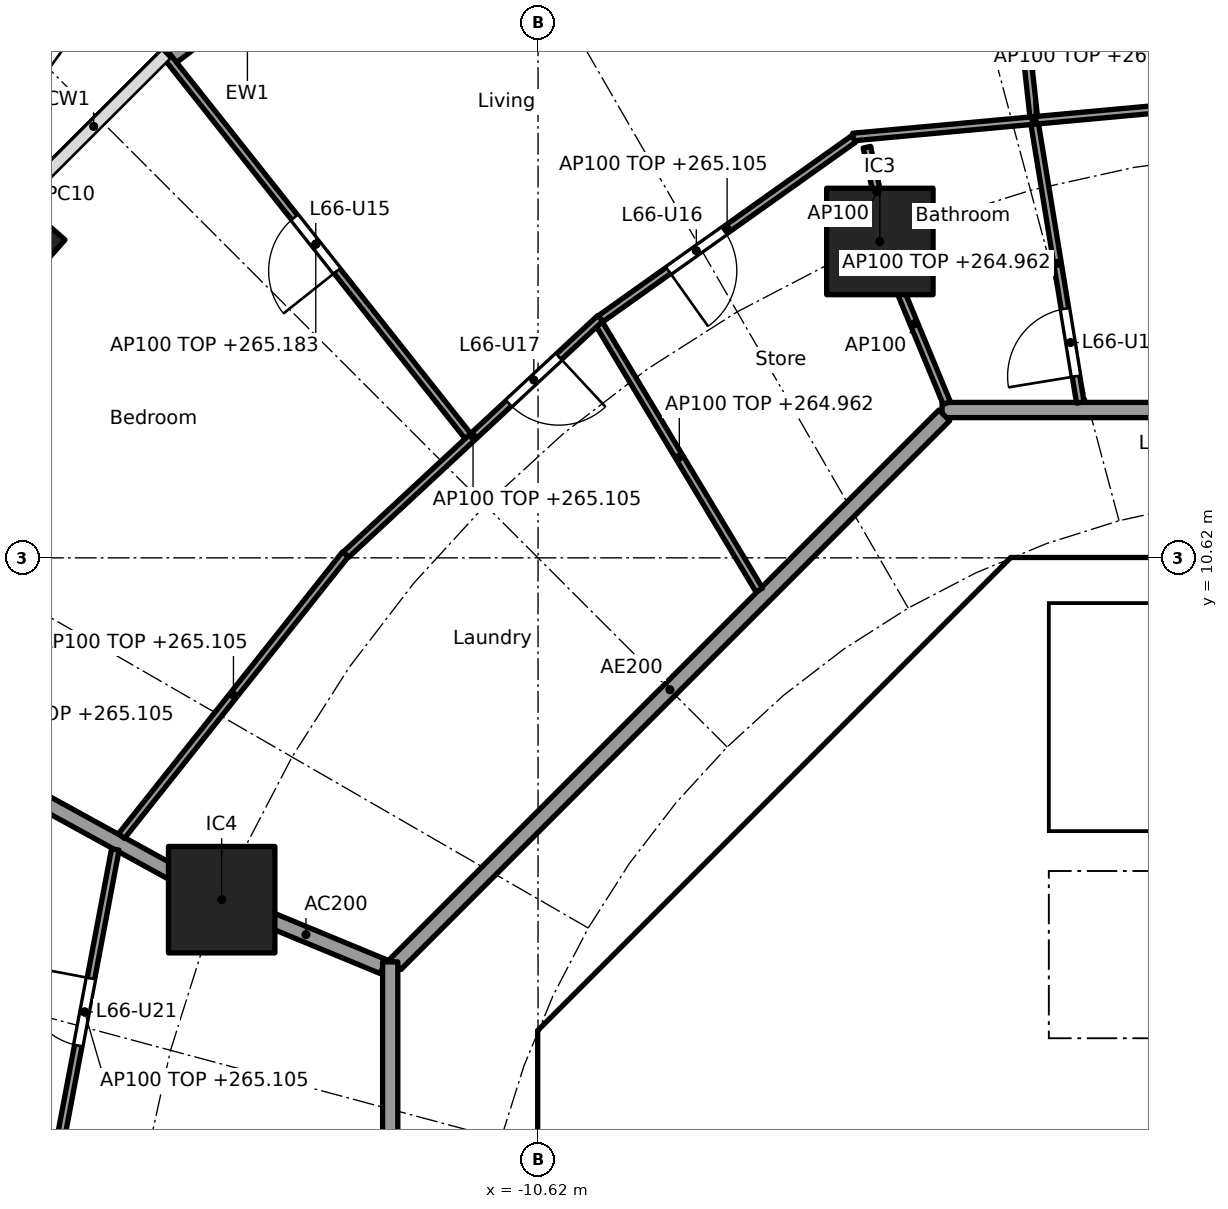
"""IFC4 building model, lengths in metres.
Left out: names, types, materials, properties, quantities, classifications, styles, units other than length and angle.
Written with IfcOpenShell. Run it as: python <this file> out.ifc"""

import sys

from ifc_helpers import new_model, si_unit, direction, frame, frame_2d, origin, origin_2d, place, context, subcontext, project, spatial, polyline, rectangle, hollow_rectangle, outline, extrude, element, fill, save


model = new_model("IFC4")
c1 = context("Model", 3, precision=1e-05, world=origin(), true_north=direction((0.0, 1.0)))
c2 = subcontext(c1, "Body", "Model", "MODEL_VIEW")
j1 = project(units=[si_unit("LENGTHUNIT", "METRE"), si_unit("PLANEANGLEUNIT", "RADIAN")], contexts=[c1])
p1 = place(None, origin())
s1 = spatial("IfcSite", under=j1, at=p1, CompositionType="ELEMENT")
p2 = place(p1, origin())
s2 = spatial("IfcBuilding", under=s1, at=p2, CompositionType="ELEMENT")
p3 = place(p2, frame((0.0, 0.0, 262.2)))
s3 = spatial("IfcBuildingStorey", under=s2, at=p3, CompositionType="ELEMENT", Elevation=262.2)
p4 = place(p3, frame((-17.441, 14.73, 0.0), z_axis=(0.0, 0.0, 1.0), x_axis=(-0.660114607735, -0.751164898445, 0.0)))
e1 = element("IfcColumn", 1, at=p4, inside=s3, PredefinedType="COLUMN", context=c2, shape_type="SweptSolid", body=[
    extrude(hollow_rectangle(XDim=0.9, YDim=0.8, WallThickness=0.028, at=origin_2d()), origin(), (0.0, 0.0, 1.0), 3.7),
])
for number, where, z_axis, x_axis in (
    (2, (-6.123, 14.782, 0.0), (0.0, 0.0, 1.0), (1.0, 0.0, 0.0)),
    (3, (-14.782, 6.123, 0.0), (0.0, 0.0, 1.0), (1.0, 0.0, 0.0)),
):
    element("IfcColumn", number, at=place(p3, frame(where, z_axis=z_axis, x_axis=x_axis)), inside=s3, PredefinedType="COLUMN", context=c2, shape_type="SweptSolid", body=[
        extrude(rectangle(XDim=1.4, YDim=1.4, at=origin_2d()), origin(), (0.0, 0.0, 1.0), 3.7),
    ])
p5 = place(p3, frame((-15.495, 17.204, 0.0), z_axis=(0.0, 0.0, 1.0), x_axis=(0.796010739377, 0.605282498339, 0.0)))
e4 = element("IfcWall", 4, at=p5, inside=s3, PredefinedType="SOLIDWALL", context=c2, shape_type="SweptSolid", body=[
    extrude(rectangle(XDim=2.641, YDim=0.25, at=frame_2d((1.32, 0.0))), origin(), (0.0, 0.0, 1.0), 3.44),
])
p6 = place(p5, frame((0.27, 0.0, 0.0)))
e5 = element("IfcOpeningElement", 5, at=p6, cuts=e4, PredefinedType="OPENING", context=c2, shape_type="SweptSolid", body=[
    extrude(rectangle(XDim=2.1, YDim=2.4, at=frame_2d((1.05, 1.2))), frame((0.0, 0.135, 0.0), z_axis=(0.0, -1.0, 0.0), x_axis=(1.0, 0.0, 0.0)), (0.0, 0.0, 1.0), 0.27),
])
p7 = place(p3, frame((-4.613, 9.988, 0.0), z_axis=(0.0, 0.0, 1.0), x_axis=(-0.707106781187, -0.707106781187, 0.0)))
e6 = element("IfcWall", 6, at=p7, inside=s3, PredefinedType="SHEAR", context=c2, shape_type="SweptSolid", body=[
    extrude(rectangle(XDim=7.602, YDim=0.6, at=frame_2d((3.801, 0.0))), origin(), (0.0, 0.0, 1.0), 3.44),
])
p8 = place(p7, frame((0.351, 0.0, 0.0)))
e7 = element("IfcOpeningElement", 7, at=p8, cuts=e6, PredefinedType="OPENING", context=c2, shape_type="SweptSolid", body=[
    extrude(rectangle(XDim=1.1, YDim=2.1, at=frame_2d((0.55, 1.05))), frame((0.0, 0.31, 0.0), z_axis=(0.0, -1.0, 0.0), x_axis=(1.0, 0.0, 0.0)), (0.0, 0.0, 1.0), 0.62),
])
p9 = place(p3, frame((-10.325, 3.801, 0.0), z_axis=(0.0, 0.0, 1.0), x_axis=(0.0, -1.0, 0.0)))
e8 = element("IfcWall", 8, at=p9, inside=s3, PredefinedType="SHEAR", context=c2, shape_type="SweptSolid", body=[
    extrude(rectangle(XDim=7.602, YDim=0.6, at=frame_2d((3.801, 0.0))), origin(), (0.0, 0.0, 1.0), 3.44),
])
p10 = place(p9, frame((0.651, 0.0, 0.0)))
e9 = element("IfcOpeningElement", 9, at=p10, cuts=e8, PredefinedType="OPENING", context=c2, shape_type="SweptSolid", body=[
    extrude(rectangle(XDim=1.5, YDim=2.1, at=frame_2d((0.75, 1.05))), frame((0.0, 0.31, 0.0), z_axis=(0.0, -1.0, 0.0), x_axis=(1.0, 0.0, 0.0)), (0.0, 0.0, 1.0), 0.62),
])
p11 = place(p9, frame((5.451, 0.0, 0.0)))
e10 = element("IfcOpeningElement", 10, at=p11, cuts=e8, PredefinedType="OPENING", context=c2, shape_type="SweptSolid", body=[
    extrude(rectangle(XDim=1.5, YDim=2.1, at=frame_2d((0.75, 1.05))), frame((0.0, 0.31, 0.0), z_axis=(0.0, -1.0, 0.0), x_axis=(1.0, 0.0, 0.0)), (0.0, 0.0, 1.0), 0.62),
])
p12 = place(p3, frame((-5.8, 4.3, 0.0), z_axis=(0.0, 0.0, 1.0), x_axis=(0.0, 1.0, 0.0)))
e11 = element("IfcWall", 11, at=p12, inside=s3, PredefinedType="PARTITIONING", context=c2, shape_type="SweptSolid", body=[
    extrude(rectangle(XDim=3.927, YDim=0.15, at=frame_2d((1.963, 0.0))), origin(), (0.0, 0.0, 1.0), 3.44),
])
p13 = place(p12, frame((1.551, 0.0, 0.0)))
e12 = element("IfcOpeningElement", 12, at=p13, cuts=e11, PredefinedType="OPENING", context=c2, shape_type="SweptSolid", body=[
    extrude(rectangle(XDim=0.9, YDim=2.1, at=frame_2d((0.45, 1.05))), frame((0.0, 0.085, 0.0), z_axis=(0.0, -1.0, 0.0), x_axis=(1.0, 0.0, 0.0)), (0.0, 0.0, 1.0), 0.17),
])
p14 = place(p3, frame((-4.0, 4.3, 0.0), z_axis=(0.0, 0.0, 1.0), x_axis=(0.0, 1.0, 0.0)))
e13 = element("IfcWall", 13, at=p14, inside=s3, PredefinedType="SOLIDWALL", context=c2, shape_type="SweptSolid", body=[
    extrude(rectangle(XDim=2.2, YDim=0.2, at=frame_2d((1.1, 0.0))), origin(), (0.0, 0.0, 1.0), 3.44),
])
p15 = place(p14, frame((0.55, 0.0, 0.0)))
e14 = element("IfcOpeningElement", 14, at=p15, cuts=e13, PredefinedType="OPENING", context=c2, shape_type="SweptSolid", body=[
    extrude(rectangle(XDim=1.1, YDim=2.1, at=frame_2d((0.55, 1.05))), frame((0.0, 0.11, 0.0), z_axis=(0.0, -1.0, 0.0), x_axis=(1.0, 0.0, 0.0)), (0.0, 0.0, 1.0), 0.22),
])
p16 = place(p3, origin())
e15 = element("IfcWall", 15, at=p16, inside=s3, PredefinedType="SHEAR", context=c2, shape_type="SweptSolid", body=[
    extrude(outline(polyline([(-10.2, 4.825), (-9.776, 4.401), (-10.025, 4.152), (-10.025, 3.801), (-10.625, 3.801), (-10.625, 4.401), (-10.2, 4.825)])), origin(), (0.0, 0.0, 1.0), 3.44),
])
p17 = place(p3, origin())
e16 = element("IfcWall", 16, at=p17, inside=s3, PredefinedType="SHEAR", context=c2, shape_type="SweptSolid", body=[
    extrude(outline(polyline([(-4.152, 10.025), (-4.401, 9.776), (-4.825, 10.2), (-4.401, 10.625), (4.401, 10.625), (4.825, 10.2), (4.401, 9.776), (4.152, 10.025), (-4.152, 10.025)])), origin(), (0.0, 0.0, 1.0), 3.44),
])
p18 = place(p3, origin())
e17 = element("IfcWall", 17, at=p18, inside=s3, PredefinedType="SOLIDWALL", context=c2, shape_type="SweptSolid", body=[
    extrude(outline(polyline([(-6.7, 4.3), (6.7, 4.3), (6.7, 2.1), (6.5, 2.1), (6.5, 4.1), (4.5, 4.1), (4.5, 2.1), (4.3, 2.1), (4.3, 4.1), (0.1, 4.1), (0.1, 2.1), (-0.1, 2.1), (-0.1, 4.1), (-6.5, 4.1), (-6.5, 2.1), (-6.7, 2.1), (-6.7, 4.3)])), origin(), (0.0, 0.0, 1.0), 3.44),
])
p19 = place(p3, frame((-10.025, 4.0, 0.0), z_axis=(0.0, 0.0, 1.0), x_axis=(1.0, 0.0, 0.0)))
e18 = element("IfcWall", 18, at=p19, inside=s3, PredefinedType="PARTITIONING", context=c2, shape_type="SweptSolid", body=[
    extrude(rectangle(XDim=3.325, YDim=0.2, at=frame_2d((1.662, 0.0))), origin(), (0.0, 0.0, 1.0), 3.44),
])
p20 = place(p3, origin())
e19 = element("IfcWall", 19, at=p20, inside=s3, PredefinedType="SOLIDWALL", context=c2, shape_type="SweptSolid", body=[
    extrude(outline(polyline([(-3.9, 7.025), (-4.1, 7.025), (-4.1, 10.025), (-3.9, 10.025), (-3.9, 7.025)])), origin(), (0.0, 0.0, 1.0), 3.44),
])
p21 = place(p3, origin())
e20 = element("IfcWall", 20, at=p21, inside=s3, PredefinedType="SOLIDWALL", context=c2, shape_type="SweptSolid", body=[
    extrude(outline(polyline([(4.1, 6.5), (-4.1, 6.5), (-4.1, 7.025), (4.1, 7.025), (4.1, 6.5)])), origin(), (0.0, 0.0, 1.0), 3.44),
])
p22 = place(p3, frame((-12.657, 5.243, 0.0), z_axis=(0.0, 0.0, 1.0), x_axis=(-0.923869415315, 0.382707856524, 0.0)))
e21 = element("IfcWall", 21, at=p22, inside=s3, PredefinedType="PARTITIONING", context=c2, shape_type="SweptSolid", body=[
    extrude(rectangle(XDim=2.2, YDim=0.2, at=frame_2d((1.1, 0.0))), origin(), (0.0, 0.0, 1.0), 3.44),
])
p23 = place(p3, frame((-14.826, 6.147, 0.0), z_axis=(0.0, 0.0, 1.0), x_axis=(-0.876484755865, 0.481429613481, 0.0)))
e22 = element("IfcWall", 22, at=p23, inside=s3, PredefinedType="PARTITIONING", context=c2, shape_type="SweptSolid", body=[
    extrude(rectangle(XDim=6.439, YDim=0.2, at=frame_2d((3.219, 0.0))), origin(), (0.0, 0.0, 1.0), 2.905),
])
p24 = place(p3, frame((5.104, 12.565, 0.0), z_axis=(0.0, 0.0, 1.0), x_axis=(-1.0, 0.0, 0.0)))
e23 = element("IfcWall", 23, at=p24, inside=s3, PredefinedType="PARTITIONING", context=c2, shape_type="SweptSolid", body=[
    extrude(rectangle(XDim=10.409, YDim=0.2, at=frame_2d((5.205, 0.0))), origin(), (0.0, 0.0, 1.0), 3.44),
])
p25 = place(p24, frame((6.339, 0.0, 0.0)))
e24 = element("IfcOpeningElement", 24, at=p25, cuts=e23, PredefinedType="OPENING", context=c2, shape_type="SweptSolid", body=[
    extrude(rectangle(XDim=1.0, YDim=2.1, at=frame_2d((0.5, 1.05))), frame((0.0, 0.11, 0.0), z_axis=(0.0, -1.0, 0.0), x_axis=(1.0, 0.0, 0.0)), (0.0, 0.0, 1.0), 0.22),
])
p26 = place(p3, frame((-5.275, 12.494, 0.0), z_axis=(0.0, 0.0, 1.0), x_axis=(-0.707106781187, -0.707106781187, 0.0)))
e25 = element("IfcWall", 25, at=p26, inside=s3, PredefinedType="PARTITIONING", context=c2, shape_type="SweptSolid", body=[
    extrude(rectangle(XDim=10.209, YDim=0.2, at=frame_2d((5.104, 0.0))), origin(), (0.0, 0.0, 1.0), 3.44),
])
p27 = place(p3, frame((-12.565, 5.304, 0.0), z_axis=(0.0, 0.0, 1.0), x_axis=(0.0, -1.0, 0.0)))
e26 = element("IfcWall", 26, at=p27, inside=s3, PredefinedType="PARTITIONING", context=c2, shape_type="SweptSolid", body=[
    extrude(rectangle(XDim=10.409, YDim=0.2, at=frame_2d((5.205, 0.0))), origin(), (0.0, 0.0, 1.0), 3.44),
])
p28 = place(p27, frame((6.539, 0.0, 0.0)))
e27 = element("IfcOpeningElement", 27, at=p28, cuts=e26, PredefinedType="OPENING", context=c2, shape_type="SweptSolid", body=[
    extrude(rectangle(XDim=1.0, YDim=2.1, at=frame_2d((0.5, 1.05))), frame((0.0, 0.11, 0.0), z_axis=(0.0, -1.0, 0.0), x_axis=(1.0, 0.0, 0.0)), (0.0, 0.0, 1.0), 0.22),
])
p29 = place(p3, frame((-1.711, 16.592, 0.0), z_axis=(0.0, 0.0, 1.0), x_axis=(-0.995843707015, -0.091078599017, 0.0)))
e28 = element("IfcWall", 28, at=p29, inside=s3, PredefinedType="PARTITIONING", context=c2, shape_type="SweptSolid", body=[
    extrude(rectangle(XDim=4.785, YDim=0.1, at=frame_2d((2.392, 0.0))), origin(), (0.0, 0.0, 1.0), 2.905),
])
p30 = place(p3, frame((-3.486, 12.663, 0.0), z_axis=(0.0, 0.0, 1.0), x_axis=(-0.161602751674, 0.986855891532, 0.0)))
e29 = element("IfcWall", 29, at=p30, inside=s3, PredefinedType="PARTITIONING", context=c2, shape_type="SweptSolid", body=[
    extrude(rectangle(XDim=3.71, YDim=0.1, at=frame_2d((1.855, 0.0))), origin(), (0.0, 0.0, 1.0), 2.762),
])
p31 = place(p30, frame((0.35, 0.0, 0.0)))
e30 = element("IfcOpeningElement", 30, at=p31, cuts=e29, PredefinedType="OPENING", context=c2, shape_type="SweptSolid", body=[
    extrude(rectangle(XDim=0.9, YDim=2.1, at=frame_2d((0.45, 1.05))), frame((0.0, 0.06, 0.0), z_axis=(0.0, -1.0, 0.0), x_axis=(1.0, 0.0, 0.0)), (0.0, 0.0, 1.0), 0.12),
])
p32 = place(p3, frame((-4.099, 16.424, 0.0), z_axis=(0.0, 0.0, 1.0), x_axis=(-0.10867295252, 0.99407755703, 0.0)))
e31 = element("IfcWall", 31, at=p32, inside=s3, PredefinedType="PARTITIONING", context=c2, shape_type="SweptSolid", body=[
    extrude(rectangle(XDim=5.974, YDim=0.1, at=frame_2d((2.987, 0.0))), origin(), (0.0, 0.0, 1.0), 2.983),
])
p33 = place(p32, frame((2.537, 0.0, 0.0)))
e32 = element("IfcOpeningElement", 32, at=p33, cuts=e31, PredefinedType="OPENING", context=c2, shape_type="SweptSolid", body=[
    extrude(rectangle(XDim=0.9, YDim=2.1, at=frame_2d((0.45, 1.05))), frame((0.0, 0.06, 0.0), z_axis=(0.0, -1.0, 0.0), x_axis=(1.0, 0.0, 0.0)), (0.0, 0.0, 1.0), 0.12),
])
p34 = place(p3, frame((-5.243, 12.657, 0.0), z_axis=(0.0, 0.0, 1.0), x_axis=(-0.382719158442, 0.923864733477, 0.0)))
e33 = element("IfcWall", 33, at=p34, inside=s3, PredefinedType="PARTITIONING", context=c2, shape_type="SweptSolid", body=[
    extrude(rectangle(XDim=2.25, YDim=0.1, at=frame_2d((1.125, 0.0))), origin(), (0.0, 0.0, 1.0), 3.44),
])
p35 = place(p3, frame((-6.467, 16.132, 0.0), z_axis=(0.0, 0.0, 1.0), x_axis=(-0.815192286069, -0.579190414919, 0.0)))
e34 = element("IfcWall", 34, at=p35, inside=s3, PredefinedType="PARTITIONING", context=c2, shape_type="SweptSolid", body=[
    extrude(rectangle(XDim=4.086, YDim=0.1, at=frame_2d((2.043, 0.0))), origin(), (0.0, 0.0, 1.0), 2.905),
])
p36 = place(p35, frame((2.09, 0.0, 0.0)))
e35 = element("IfcOpeningElement", 35, at=p36, cuts=e34, PredefinedType="OPENING", context=c2, shape_type="SweptSolid", body=[
    extrude(rectangle(XDim=0.9, YDim=2.1, at=frame_2d((0.45, 1.05))), frame((0.0, 0.06, 0.0), z_axis=(0.0, -1.0, 0.0), x_axis=(1.0, 0.0, 0.0)), (0.0, 0.0, 1.0), 0.12),
])
p37 = place(p3, frame((-7.709, 10.197, 0.0), z_axis=(0.0, 0.0, 1.0), x_axis=(-0.515524871668, 0.856874615502, 0.0)))
e36 = element("IfcWall", 36, at=p37, inside=s3, PredefinedType="PARTITIONING", context=c2, shape_type="SweptSolid", body=[
    extrude(rectangle(XDim=4.08, YDim=0.1, at=frame_2d((2.04, 0.0))), origin(), (0.0, 0.0, 1.0), 2.762),
])
p38 = place(p3, frame((-9.802, 13.77, 0.0), z_axis=(0.0, 0.0, 1.0), x_axis=(-0.732662099478, -0.680592571212, 0.0)))
e37 = element("IfcWall", 37, at=p38, inside=s3, PredefinedType="PARTITIONING", context=c2, shape_type="SweptSolid", body=[
    extrude(rectangle(XDim=4.567, YDim=0.1, at=frame_2d((2.283, 0.0))), origin(), (0.0, 0.0, 1.0), 2.905),
])
p39 = place(p38, frame((0.742, 0.0, 0.0)))
e38 = element("IfcOpeningElement", 38, at=p39, cuts=e37, PredefinedType="OPENING", context=c2, shape_type="SweptSolid", body=[
    extrude(rectangle(XDim=0.9, YDim=2.1, at=frame_2d((0.45, 1.05))), frame((0.0, 0.06, 0.0), z_axis=(0.0, -1.0, 0.0), x_axis=(1.0, 0.0, 0.0)), (0.0, 0.0, 1.0), 0.12),
])
p40 = place(p3, frame((-11.543, 12.221, 0.0), z_axis=(0.0, 0.0, 1.0), x_axis=(-0.621117202271, 0.783717692185, 0.0)))
e39 = element("IfcWall", 39, at=p40, inside=s3, PredefinedType="PARTITIONING", context=c2, shape_type="SweptSolid", body=[
    extrude(rectangle(XDim=6.444, YDim=0.1, at=frame_2d((3.222, 0.0))), origin(), (0.0, 0.0, 1.0), 2.983),
])
p41 = place(p40, frame((2.772, 0.0, 0.0)))
e40 = element("IfcOpeningElement", 40, at=p41, cuts=e39, PredefinedType="OPENING", context=c2, shape_type="SweptSolid", body=[
    extrude(rectangle(XDim=0.9, YDim=2.1, at=frame_2d((0.45, 1.05))), frame((0.0, 0.06, 0.0), z_axis=(0.0, -1.0, 0.0), x_axis=(1.0, 0.0, 0.0)), (0.0, 0.0, 1.0), 0.12),
])
p42 = place(p3, frame((-13.154, 10.667, 0.0), z_axis=(0.0, 0.0, 1.0), x_axis=(-0.622246555556, -0.782821323227, 0.0)))
e41 = element("IfcWall", 41, at=p42, inside=s3, PredefinedType="PARTITIONING", context=c2, shape_type="SweptSolid", body=[
    extrude(rectangle(XDim=4.736, YDim=0.1, at=frame_2d((2.368, 0.0))), origin(), (0.0, 0.0, 1.0), 2.905),
])
p43 = place(p3, frame((-16.181, 6.783, 0.0), z_axis=(0.0, 0.0, 1.0), x_axis=(-0.185670583745, -0.982612046706, 0.0)))
e42 = element("IfcWall", 42, at=p43, inside=s3, PredefinedType="PARTITIONING", context=c2, shape_type="SweptSolid", body=[
    extrude(rectangle(XDim=4.351, YDim=0.1, at=frame_2d((2.176, 0.0))), origin(), (0.0, 0.0, 1.0), 2.905),
])
p44 = place(p43, frame((1.726, 0.0, 0.0)))
e43 = element("IfcOpeningElement", 43, at=p44, cuts=e42, PredefinedType="OPENING", context=c2, shape_type="SweptSolid", body=[
    extrude(rectangle(XDim=0.9, YDim=2.1, at=frame_2d((0.45, 1.05))), frame((0.0, 0.06, 0.0), z_axis=(0.0, -1.0, 0.0), x_axis=(1.0, 0.0, 0.0)), (0.0, 0.0, 1.0), 0.12),
])
p45 = place(p3, frame((-16.949, 2.451, 0.0), z_axis=(0.0, 0.0, 1.0), x_axis=(-0.986937570833, 0.161103169673, 0.0)))
e44 = element("IfcWall", 44, at=p45, inside=s3, PredefinedType="PARTITIONING", context=c2, shape_type="SweptSolid", body=[
    extrude(rectangle(XDim=5.743, YDim=0.1, at=frame_2d((2.872, 0.0))), origin(), (0.0, 0.0, 1.0), 2.905),
])
p46 = place(p3, frame((-6.036, 14.853, 0.0), z_axis=(0.0, 0.0, 1.0), x_axis=(-0.215009518078, 0.976611953202, 0.0)))
e45 = element("IfcWall", 45, at=p46, inside=s3, PredefinedType="PARTITIONING", context=c2, shape_type="SweptSolid", body=[
    extrude(rectangle(XDim=1.198, YDim=0.1, at=frame_2d((0.599, 0.0))), origin(), (0.0, 0.0, 1.0), 3.44),
])
p47 = place(p15, origin())
e46 = element("IfcDoor", 46, at=p47, inside=s3, OperationType="DOUBLE_DOOR_SLIDING", PredefinedType="DOOR", context=c2, shape_type="SweptSolid", body=[
    extrude(rectangle(XDim=1.1, YDim=2.1, at=frame_2d((0.55, 1.05))), frame((0.0, 0.025, 0.0), z_axis=(0.0, -1.0, 0.0), x_axis=(1.0, 0.0, 0.0)), (0.0, 0.0, 1.0), 0.05),
])
fill(e14, e46)
p48 = place(p13, origin())
e47 = element("IfcDoor", 47, at=p48, inside=s3, OperationType="SINGLE_SWING_LEFT", PredefinedType="DOOR", context=c2, shape_type="SweptSolid", body=[
    extrude(rectangle(XDim=0.9, YDim=2.1, at=frame_2d((0.45, 1.05))), frame((0.0, 0.025, 0.0), z_axis=(0.0, -1.0, 0.0), x_axis=(1.0, 0.0, 0.0)), (0.0, 0.0, 1.0), 0.05),
])
fill(e12, e47)
p49 = place(p10, origin())
e48 = element("IfcDoor", 48, at=p49, inside=s3, OperationType="DOUBLE_DOOR_SINGLE_SWING", PredefinedType="DOOR", context=c2, shape_type="SweptSolid", body=[
    extrude(rectangle(XDim=1.5, YDim=2.1, at=frame_2d((0.75, 1.05))), frame((0.0, 0.025, 0.0), z_axis=(0.0, -1.0, 0.0), x_axis=(1.0, 0.0, 0.0)), (0.0, 0.0, 1.0), 0.05),
])
fill(e9, e48)
p50 = place(p8, origin())
e49 = element("IfcDoor", 49, at=p50, inside=s3, OperationType="SINGLE_SWING_RIGHT", PredefinedType="DOOR", context=c2, shape_type="SweptSolid", body=[
    extrude(rectangle(XDim=1.1, YDim=2.1, at=frame_2d((0.55, 1.05))), frame((0.0, 0.025, 0.0), z_axis=(0.0, -1.0, 0.0), x_axis=(1.0, 0.0, 0.0)), (0.0, 0.0, 1.0), 0.05),
])
fill(e7, e49)
p51 = place(p31, origin())
e50 = element("IfcDoor", 50, at=p51, inside=s3, OperationType="SINGLE_SWING_LEFT", PredefinedType="DOOR", context=c2, shape_type="SweptSolid", body=[
    extrude(rectangle(XDim=0.9, YDim=2.1, at=frame_2d((0.45, 1.05))), frame((0.0, 0.025, 0.0), z_axis=(0.0, -1.0, 0.0), x_axis=(1.0, 0.0, 0.0)), (0.0, 0.0, 1.0), 0.05),
])
fill(e30, e50)
p52 = place(p41, origin())
e51 = element("IfcDoor", 51, at=p52, inside=s3, OperationType="SINGLE_SWING_LEFT", PredefinedType="DOOR", context=c2, shape_type="SweptSolid", body=[
    extrude(rectangle(XDim=0.9, YDim=2.1, at=frame_2d((0.45, 1.05))), frame((0.0, 0.025, 0.0), z_axis=(0.0, -1.0, 0.0), x_axis=(1.0, 0.0, 0.0)), (0.0, 0.0, 1.0), 0.05),
])
fill(e40, e51)
p53 = place(p36, origin())
e52 = element("IfcDoor", 52, at=p53, inside=s3, OperationType="SINGLE_SWING_RIGHT", PredefinedType="DOOR", context=c2, shape_type="SweptSolid", body=[
    extrude(rectangle(XDim=0.9, YDim=2.1, at=frame_2d((0.45, 1.05))), frame((0.0, 0.025, 0.0), z_axis=(0.0, -1.0, 0.0), x_axis=(1.0, 0.0, 0.0)), (0.0, 0.0, 1.0), 0.05),
])
fill(e35, e52)
p54 = place(p39, origin())
e53 = element("IfcDoor", 53, at=p54, inside=s3, OperationType="SINGLE_SWING_LEFT", PredefinedType="DOOR", context=c2, shape_type="SweptSolid", body=[
    extrude(rectangle(XDim=0.9, YDim=2.1, at=frame_2d((0.45, 1.05))), frame((0.0, 0.025, 0.0), z_axis=(0.0, -1.0, 0.0), x_axis=(1.0, 0.0, 0.0)), (0.0, 0.0, 1.0), 0.05),
])
fill(e38, e53)
p55 = place(p44, frame((0.9, 0.0, 0.0), x_axis=(-1.0, 0.0, 0.0)))
e54 = element("IfcDoor", 54, at=p55, inside=s3, OperationType="SINGLE_SWING_RIGHT", PredefinedType="DOOR", context=c2, shape_type="SweptSolid", body=[
    extrude(rectangle(XDim=0.9, YDim=2.1, at=frame_2d((0.45, 1.05))), frame((0.0, 0.025, 0.0), z_axis=(0.0, -1.0, 0.0), x_axis=(1.0, 0.0, 0.0)), (0.0, 0.0, 1.0), 0.05),
])
fill(e43, e54)
save(model, sys.argv[1])
